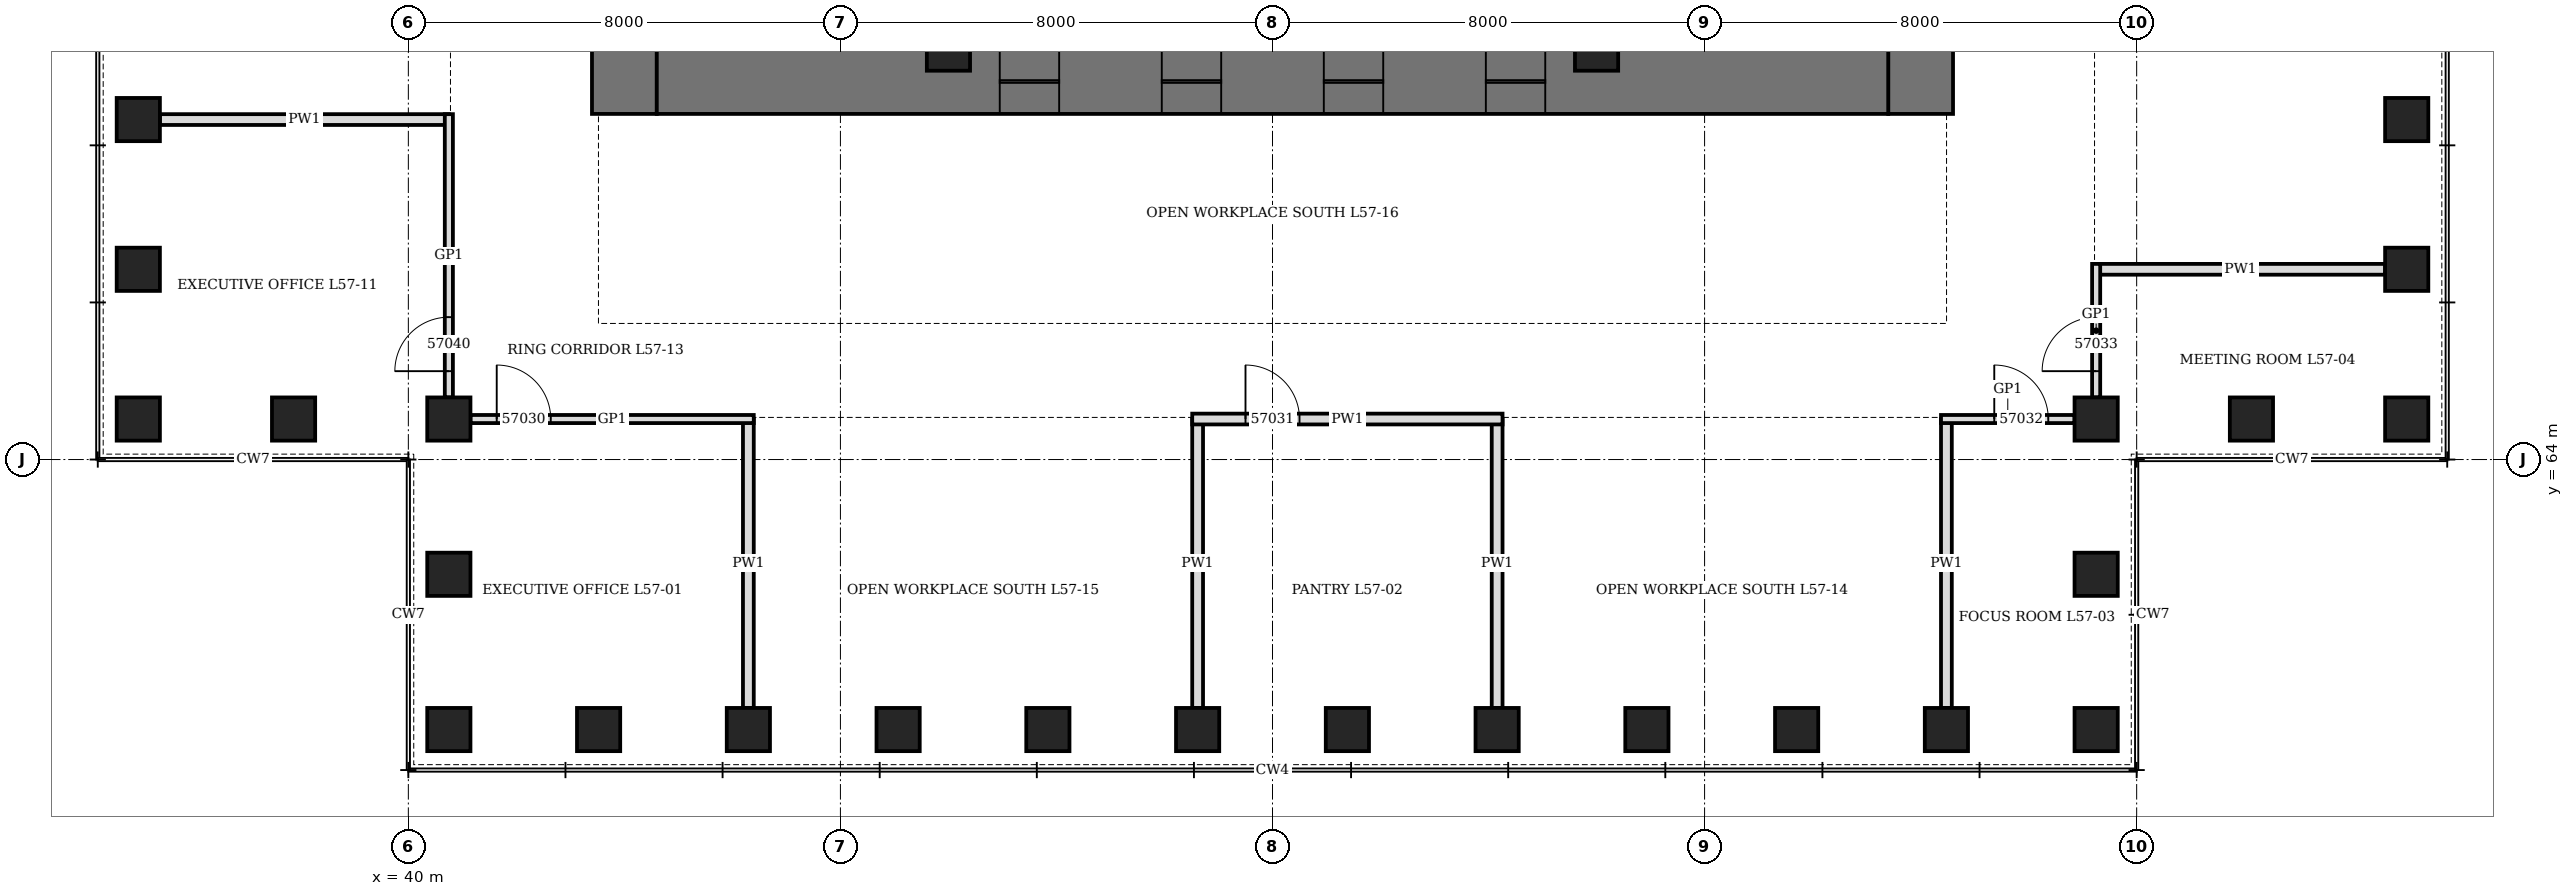
"""IFC4 building model, lengths in metres.
Left out: names, types, materials, properties, quantities, classifications, styles, units other than length and angle.
Written with IfcOpenShell. Run it as: python <this file> out.ifc"""

import sys

from ifc_helpers import new_model, si_unit, direction, frame, frame_2d, origin, origin_2d, place, context, subcontext, project, spatial, rectangle, hollow_rectangle, extrude, element, fill, save


model = new_model("IFC4")
c1 = context("Model", 3, precision=1e-05, world=origin(), true_north=direction((0.0, 1.0)))
c2 = subcontext(c1, "Body", "Model", "MODEL_VIEW")
j1 = project(units=[si_unit("LENGTHUNIT", "METRE"), si_unit("PLANEANGLEUNIT", "RADIAN")], contexts=[c1])
p1 = place(None, origin())
s1 = spatial("IfcSite", under=j1, at=p1, CompositionType="ELEMENT")
p2 = place(p1, origin())
s2 = spatial("IfcBuilding", under=s1, at=p2, CompositionType="ELEMENT")
p3 = place(p2, frame((0.0, 0.0, 254.5)))
s3 = spatial("IfcBuildingStorey", under=s2, at=p3, CompositionType="ELEMENT", Elevation=254.5)
for number, where, z_axis, x_axis in (
    (1, (40.75, 59.0, 0.0), (0.0, 0.0, 1.0), (1.0, 0.0, 0.0)),
    (2, (43.523, 59.0, 0.0), (0.0, 0.0, 1.0), (1.0, 0.0, 0.0)),
    (3, (46.295, 59.0, 0.0), (0.0, 0.0, 1.0), (1.0, 0.0, 0.0)),
    (4, (49.068, 59.0, 0.0), (0.0, 0.0, 1.0), (1.0, 0.0, 0.0)),
    (5, (51.841, 59.0, 0.0), (0.0, 0.0, 1.0), (1.0, 0.0, 0.0)),
    (6, (54.614, 59.0, 0.0), (0.0, 0.0, 1.0), (1.0, 0.0, 0.0)),
    (7, (57.386, 59.0, 0.0), (0.0, 0.0, 1.0), (1.0, 0.0, 0.0)),
    (8, (60.159, 59.0, 0.0), (0.0, 0.0, 1.0), (1.0, 0.0, 0.0)),
    (9, (62.932, 59.0, 0.0), (0.0, 0.0, 1.0), (1.0, 0.0, 0.0)),
    (10, (65.705, 59.0, 0.0), (0.0, 0.0, 1.0), (1.0, 0.0, 0.0)),
    (11, (68.477, 59.0, 0.0), (0.0, 0.0, 1.0), (1.0, 0.0, 0.0)),
    (12, (71.25, 59.0, 0.0), (0.0, 0.0, 1.0), (0.0, 1.0, 0.0)),
    (13, (71.25, 61.875, 0.0), (0.0, 0.0, 1.0), (0.0, 1.0, 0.0)),
    (14, (71.25, 64.75, 0.0), (0.0, 0.0, 1.0), (1.0, 0.0, 0.0)),
    (15, (74.125, 64.75, 0.0), (0.0, 0.0, 1.0), (1.0, 0.0, 0.0)),
    (16, (77.0, 64.75, 0.0), (0.0, 0.0, 1.0), (0.0, 1.0, 0.0)),
    (17, (77.0, 67.523, 0.0), (0.0, 0.0, 1.0), (0.0, 1.0, 0.0)),
    (18, (77.0, 70.295, 0.0), (0.0, 0.0, 1.0), (0.0, 1.0, 0.0)),
    (19, (35.0, 70.295, 0.0), (0.0, 0.0, 1.0), (0.0, 1.0, 0.0)),
    (20, (35.0, 67.523, 0.0), (0.0, 0.0, 1.0), (0.0, 1.0, 0.0)),
    (21, (35.0, 64.75, 0.0), (0.0, 0.0, 1.0), (1.0, 0.0, 0.0)),
    (22, (37.875, 64.75, 0.0), (0.0, 0.0, 1.0), (1.0, 0.0, 0.0)),
    (23, (40.75, 64.75, 0.0), (0.0, 0.0, 1.0), (0.0, 1.0, 0.0)),
    (24, (40.75, 61.875, 0.0), (0.0, 0.0, 1.0), (0.0, 1.0, 0.0)),
):
    element("IfcColumn", number, at=place(p3, frame(where, z_axis=z_axis, x_axis=x_axis)), inside=s3, PredefinedType="COLUMN", context=c2, shape_type="SweptSolid", body=[
        extrude(hollow_rectangle(XDim=0.8, YDim=0.8, WallThickness=0.1, at=origin_2d()), origin(), (0.0, 0.0, 1.0), 4.2),
    ])
p4 = place(p3, frame((44.0, 70.4, 0.0), z_axis=(0.0, 0.0, 1.0), x_axis=(0.0, 1.0, 0.0)))
e25 = element("IfcWall", 25, at=p4, inside=s3, PredefinedType="SHEAR", context=c2, shape_type="SweptSolid", body=[
    extrude(rectangle(XDim=19.2, YDim=1.2, at=frame_2d((9.6, 0.0))), origin(), (0.0, 0.0, 1.0), 4.2),
])
p5 = place(p4, frame((8.6, 0.0, 0.0)))
e26 = element("IfcOpeningElement", 26, at=p5, cuts=e25, PredefinedType="OPENING", context=c2, shape_type="SweptSolid", body=[
    extrude(rectangle(XDim=2.0, YDim=2.4, at=frame_2d((1.0, 1.2))), frame((0.0, 0.61, 0.0), z_axis=(0.0, -1.0, 0.0), x_axis=(1.0, 0.0, 0.0)), (0.0, 0.0, 1.0), 1.22),
])
p6 = place(p3, frame((68.0, 70.4, 0.0), z_axis=(0.0, 0.0, 1.0), x_axis=(0.0, 1.0, 0.0)))
e27 = element("IfcWall", 27, at=p6, inside=s3, PredefinedType="SHEAR", context=c2, shape_type="SweptSolid", body=[
    extrude(rectangle(XDim=19.2, YDim=1.2, at=frame_2d((9.6, 0.0))), origin(), (0.0, 0.0, 1.0), 4.2),
])
p7 = place(p6, frame((8.6, 0.0, 0.0)))
e28 = element("IfcOpeningElement", 28, at=p7, cuts=e27, PredefinedType="OPENING", context=c2, shape_type="SweptSolid", body=[
    extrude(rectangle(XDim=2.0, YDim=2.4, at=frame_2d((1.0, 1.2))), frame((0.0, 0.61, 0.0), z_axis=(0.0, -1.0, 0.0), x_axis=(1.0, 0.0, 0.0)), (0.0, 0.0, 1.0), 1.22),
])
p8 = place(p3, frame((44.6, 71.0, 0.0), z_axis=(0.0, 0.0, 1.0), x_axis=(1.0, 0.0, 0.0)))
e29 = element("IfcWall", 29, at=p8, inside=s3, PredefinedType="SHEAR", context=c2, shape_type="SweptSolid", body=[
    extrude(rectangle(XDim=22.8, YDim=1.2, at=frame_2d((11.4, 0.0))), origin(), (0.0, 0.0, 1.0), 4.2),
])
p9 = place(p8, frame((6.35, 0.0, 0.0)))
e30 = element("IfcOpeningElement", 30, at=p9, cuts=e29, PredefinedType="OPENING", context=c2, shape_type="SweptSolid", body=[
    extrude(rectangle(XDim=1.1, YDim=2.2, at=frame_2d((0.55, 1.1))), frame((0.0, 0.61, 0.0), z_axis=(0.0, -1.0, 0.0), x_axis=(1.0, 0.0, 0.0)), (0.0, 0.0, 1.0), 1.22),
])
p10 = place(p8, frame((9.35, 0.0, 0.0)))
e31 = element("IfcOpeningElement", 31, at=p10, cuts=e29, PredefinedType="OPENING", context=c2, shape_type="SweptSolid", body=[
    extrude(rectangle(XDim=1.1, YDim=2.2, at=frame_2d((0.55, 1.1))), frame((0.0, 0.61, 0.0), z_axis=(0.0, -1.0, 0.0), x_axis=(1.0, 0.0, 0.0)), (0.0, 0.0, 1.0), 1.22),
])
p11 = place(p8, frame((12.35, 0.0, 0.0)))
e32 = element("IfcOpeningElement", 32, at=p11, cuts=e29, PredefinedType="OPENING", context=c2, shape_type="SweptSolid", body=[
    extrude(rectangle(XDim=1.1, YDim=2.2, at=frame_2d((0.55, 1.1))), frame((0.0, 0.61, 0.0), z_axis=(0.0, -1.0, 0.0), x_axis=(1.0, 0.0, 0.0)), (0.0, 0.0, 1.0), 1.22),
])
p12 = place(p8, frame((15.35, 0.0, 0.0)))
e33 = element("IfcOpeningElement", 33, at=p12, cuts=e29, PredefinedType="OPENING", context=c2, shape_type="SweptSolid", body=[
    extrude(rectangle(XDim=1.1, YDim=2.2, at=frame_2d((0.55, 1.1))), frame((0.0, 0.61, 0.0), z_axis=(0.0, -1.0, 0.0), x_axis=(1.0, 0.0, 0.0)), (0.0, 0.0, 1.0), 1.22),
])
for number, where, z_axis, x_axis in (
    (34, (50.0, 71.6, 0.0), (0.0, 0.0, 1.0), (1.0, 0.0, 0.0)),
    (35, (62.0, 71.6, 0.0), (0.0, 0.0, 1.0), (1.0, 0.0, 0.0)),
):
    element("IfcColumn", number, at=place(p3, frame(where, z_axis=z_axis, x_axis=x_axis)), inside=s3, PredefinedType="COLUMN", context=c2, shape_type="SweptSolid", body=[
        extrude(hollow_rectangle(XDim=0.8, YDim=0.8, WallThickness=0.1, at=origin_2d()), origin(), (0.0, 0.0, 1.0), 4.2),
    ])
for number, where, z_axis, x_axis in (
    (36, (46.295, 59.4, 0.0), (0.0, 0.0, 1.0), (0.0, 1.0, 0.0)),
    (37, (54.614, 59.4, 0.0), (0.0, 0.0, 1.0), (0.0, 1.0, 0.0)),
    (38, (60.159, 59.4, 0.0), (0.0, 0.0, 1.0), (0.0, 1.0, 0.0)),
    (39, (68.477, 59.4, 0.0), (0.0, 0.0, 1.0), (0.0, 1.0, 0.0)),
    (40, (71.25, 67.523, 0.0), (0.0, 0.0, 1.0), (1.0, 0.0, 0.0)),
    (41, (35.4, 70.295, 0.0), (0.0, 0.0, 1.0), (1.0, 0.0, 0.0)),
):
    element("IfcWall", number, at=place(p3, frame(where, z_axis=z_axis, x_axis=x_axis)), inside=s3, PredefinedType="PARTITIONING", context=c2, shape_type="SweptSolid", body=[
        extrude(rectangle(XDim=5.35, YDim=0.2, at=frame_2d((2.675, 0.0))), origin(), (0.0, 0.0, 1.0), 3.428),
    ])
p13 = place(p3, frame((41.15, 64.75, 0.0), z_axis=(0.0, 0.0, 1.0), x_axis=(1.0, 0.0, 0.0)))
e42 = element("IfcWall", 42, at=p13, inside=s3, PredefinedType="PARTITIONING", context=c2, shape_type="SweptSolid", body=[
    extrude(rectangle(XDim=5.246, YDim=0.15, at=frame_2d((2.623, 0.0))), origin(), (0.0, 0.0, 1.0), 4.04),
])
p14 = place(p13, frame((0.486, 0.0, 0.0)))
e43 = element("IfcOpeningElement", 43, at=p14, cuts=e42, PredefinedType="OPENING", context=c2, shape_type="SweptSolid", body=[
    extrude(rectangle(XDim=1.0, YDim=2.1, at=frame_2d((0.5, 1.05))), frame((0.0, 0.085, 0.0), z_axis=(0.0, -1.0, 0.0), x_axis=(1.0, 0.0, 0.0)), (0.0, 0.0, 1.0), 0.17),
])
p15 = place(p3, frame((68.377, 64.75, 0.0), z_axis=(0.0, 0.0, 1.0), x_axis=(1.0, 0.0, 0.0)))
e44 = element("IfcWall", 44, at=p15, inside=s3, PredefinedType="PARTITIONING", context=c2, shape_type="SweptSolid", body=[
    extrude(rectangle(XDim=2.473, YDim=0.15, at=frame_2d((1.236, 0.0))), origin(), (0.0, 0.0, 1.0), 4.04),
])
p16 = place(p15, frame((0.986, 0.0, 0.0)))
e45 = element("IfcOpeningElement", 45, at=p16, cuts=e44, PredefinedType="OPENING", context=c2, shape_type="SweptSolid", body=[
    extrude(rectangle(XDim=1.0, YDim=2.4, at=frame_2d((0.5, 1.2))), frame((0.0, 0.085, 0.0), z_axis=(0.0, -1.0, 0.0), x_axis=(1.0, 0.0, 0.0)), (0.0, 0.0, 1.0), 0.17),
])
p17 = place(p3, frame((54.514, 64.75, 0.0), z_axis=(0.0, 0.0, 1.0), x_axis=(1.0, 0.0, 0.0)))
e46 = element("IfcWall", 46, at=p17, inside=s3, PredefinedType="PARTITIONING", context=c2, shape_type="SweptSolid", body=[
    extrude(rectangle(XDim=5.745, YDim=0.2, at=frame_2d((2.873, 0.0))), origin(), (0.0, 0.0, 1.0), 4.04),
])
p18 = place(p17, frame((0.986, 0.0, 0.0)))
e47 = element("IfcOpeningElement", 47, at=p18, cuts=e46, PredefinedType="OPENING", context=c2, shape_type="SweptSolid", body=[
    extrude(rectangle(XDim=1.0, YDim=2.1, at=frame_2d((0.5, 1.05))), frame((0.0, 0.11, 0.0), z_axis=(0.0, -1.0, 0.0), x_axis=(1.0, 0.0, 0.0)), (0.0, 0.0, 1.0), 0.22),
])
p19 = place(p3, frame((40.75, 65.15, 0.0), z_axis=(0.0, 0.0, 1.0), x_axis=(0.0, 1.0, 0.0)))
e48 = element("IfcWall", 48, at=p19, inside=s3, PredefinedType="PARTITIONING", context=c2, shape_type="SweptSolid", body=[
    extrude(rectangle(XDim=5.246, YDim=0.15, at=frame_2d((2.623, 0.0))), origin(), (0.0, 0.0, 1.0), 4.04),
])
p20 = place(p19, frame((0.486, 0.0, 0.0)))
e49 = element("IfcOpeningElement", 49, at=p20, cuts=e48, PredefinedType="OPENING", context=c2, shape_type="SweptSolid", body=[
    extrude(rectangle(XDim=1.0, YDim=2.1, at=frame_2d((0.5, 1.05))), frame((0.0, 0.085, 0.0), z_axis=(0.0, -1.0, 0.0), x_axis=(1.0, 0.0, 0.0)), (0.0, 0.0, 1.0), 0.17),
])
p21 = place(p3, frame((71.25, 65.15, 0.0), z_axis=(0.0, 0.0, 1.0), x_axis=(0.0, 1.0, 0.0)))
e50 = element("IfcWall", 50, at=p21, inside=s3, PredefinedType="PARTITIONING", context=c2, shape_type="SweptSolid", body=[
    extrude(rectangle(XDim=2.473, YDim=0.15, at=frame_2d((1.236, 0.0))), origin(), (0.0, 0.0, 1.0), 4.04),
])
p22 = place(p21, frame((0.486, 0.0, 0.0)))
e51 = element("IfcOpeningElement", 51, at=p22, cuts=e50, PredefinedType="OPENING", context=c2, shape_type="SweptSolid", body=[
    extrude(rectangle(XDim=1.0, YDim=2.4, at=frame_2d((0.5, 1.2))), frame((0.0, 0.085, 0.0), z_axis=(0.0, -1.0, 0.0), x_axis=(1.0, 0.0, 0.0)), (0.0, 0.0, 1.0), 0.17),
])
p23 = place(p9, origin())
e52 = element("IfcDoor", 52, at=p23, inside=s3, OperationType="SLIDING_TO_LEFT", PredefinedType="DOOR", context=c2, shape_type="SweptSolid", body=[
    extrude(rectangle(XDim=1.1, YDim=2.2, at=frame_2d((0.55, 1.1))), frame((0.0, 0.35, 0.0), z_axis=(0.0, -1.0, 0.0), x_axis=(1.0, 0.0, 0.0)), (0.0, 0.0, 1.0), 0.7),
])
fill(e30, e52)
p24 = place(p10, origin())
e53 = element("IfcDoor", 53, at=p24, inside=s3, OperationType="SLIDING_TO_LEFT", PredefinedType="DOOR", context=c2, shape_type="SweptSolid", body=[
    extrude(rectangle(XDim=1.1, YDim=2.2, at=frame_2d((0.55, 1.1))), frame((0.0, 0.35, 0.0), z_axis=(0.0, -1.0, 0.0), x_axis=(1.0, 0.0, 0.0)), (0.0, 0.0, 1.0), 0.7),
])
fill(e31, e53)
p25 = place(p11, origin())
e54 = element("IfcDoor", 54, at=p25, inside=s3, OperationType="SLIDING_TO_LEFT", PredefinedType="DOOR", context=c2, shape_type="SweptSolid", body=[
    extrude(rectangle(XDim=1.1, YDim=2.2, at=frame_2d((0.55, 1.1))), frame((0.0, 0.35, 0.0), z_axis=(0.0, -1.0, 0.0), x_axis=(1.0, 0.0, 0.0)), (0.0, 0.0, 1.0), 0.7),
])
fill(e32, e54)
p26 = place(p12, origin())
e55 = element("IfcDoor", 55, at=p26, inside=s3, OperationType="SLIDING_TO_LEFT", PredefinedType="DOOR", context=c2, shape_type="SweptSolid", body=[
    extrude(rectangle(XDim=1.1, YDim=2.2, at=frame_2d((0.55, 1.1))), frame((0.0, 0.35, 0.0), z_axis=(0.0, -1.0, 0.0), x_axis=(1.0, 0.0, 0.0)), (0.0, 0.0, 1.0), 0.7),
])
fill(e33, e55)
p27 = place(p14, origin())
e56 = element("IfcDoor", 56, at=p27, inside=s3, OperationType="SINGLE_SWING_LEFT", PredefinedType="DOOR", context=c2, shape_type="SweptSolid", body=[
    extrude(rectangle(XDim=1.0, YDim=2.1, at=frame_2d((0.5, 1.05))), frame((0.0, 0.075, 0.0), z_axis=(0.0, -1.0, 0.0), x_axis=(1.0, 0.0, 0.0)), (0.0, 0.0, 1.0), 0.149),
])
fill(e43, e56)
p28 = place(p18, origin())
e57 = element("IfcDoor", 57, at=p28, inside=s3, OperationType="SINGLE_SWING_LEFT", PredefinedType="DOOR", context=c2, shape_type="SweptSolid", body=[
    extrude(rectangle(XDim=1.0, YDim=2.1, at=frame_2d((0.5, 1.05))), frame((0.0, 0.1, 0.0), z_axis=(0.0, -1.0, 0.0), x_axis=(1.0, 0.0, 0.0)), (0.0, 0.0, 1.0), 0.199),
])
fill(e47, e57)
p29 = place(p16, origin())
e58 = element("IfcDoor", 58, at=p29, inside=s3, OperationType="SINGLE_SWING_RIGHT", PredefinedType="DOOR", context=c2, shape_type="SweptSolid", body=[
    extrude(rectangle(XDim=1.0, YDim=2.4, at=frame_2d((0.5, 1.2))), frame((0.0, 0.075, 0.0), z_axis=(0.0, -1.0, 0.0), x_axis=(1.0, 0.0, 0.0)), (0.0, 0.0, 1.0), 0.149),
])
fill(e45, e58)
p30 = place(p22, origin())
e59 = element("IfcDoor", 59, at=p30, inside=s3, OperationType="SINGLE_SWING_RIGHT", PredefinedType="DOOR", context=c2, shape_type="SweptSolid", body=[
    extrude(rectangle(XDim=1.0, YDim=2.4, at=frame_2d((0.5, 1.2))), frame((0.0, 0.075, 0.0), z_axis=(0.0, -1.0, 0.0), x_axis=(1.0, 0.0, 0.0)), (0.0, 0.0, 1.0), 0.149),
])
fill(e51, e59)
p31 = place(p20, origin())
e60 = element("IfcDoor", 60, at=p31, inside=s3, OperationType="SINGLE_SWING_LEFT", PredefinedType="DOOR", context=c2, shape_type="SweptSolid", body=[
    extrude(rectangle(XDim=1.0, YDim=2.1, at=frame_2d((0.5, 1.05))), frame((0.0, 0.075, 0.0), z_axis=(0.0, -1.0, 0.0), x_axis=(1.0, 0.0, 0.0)), (0.0, 0.0, 1.0), 0.149),
])
fill(e49, e60)
save(model, sys.argv[1])
